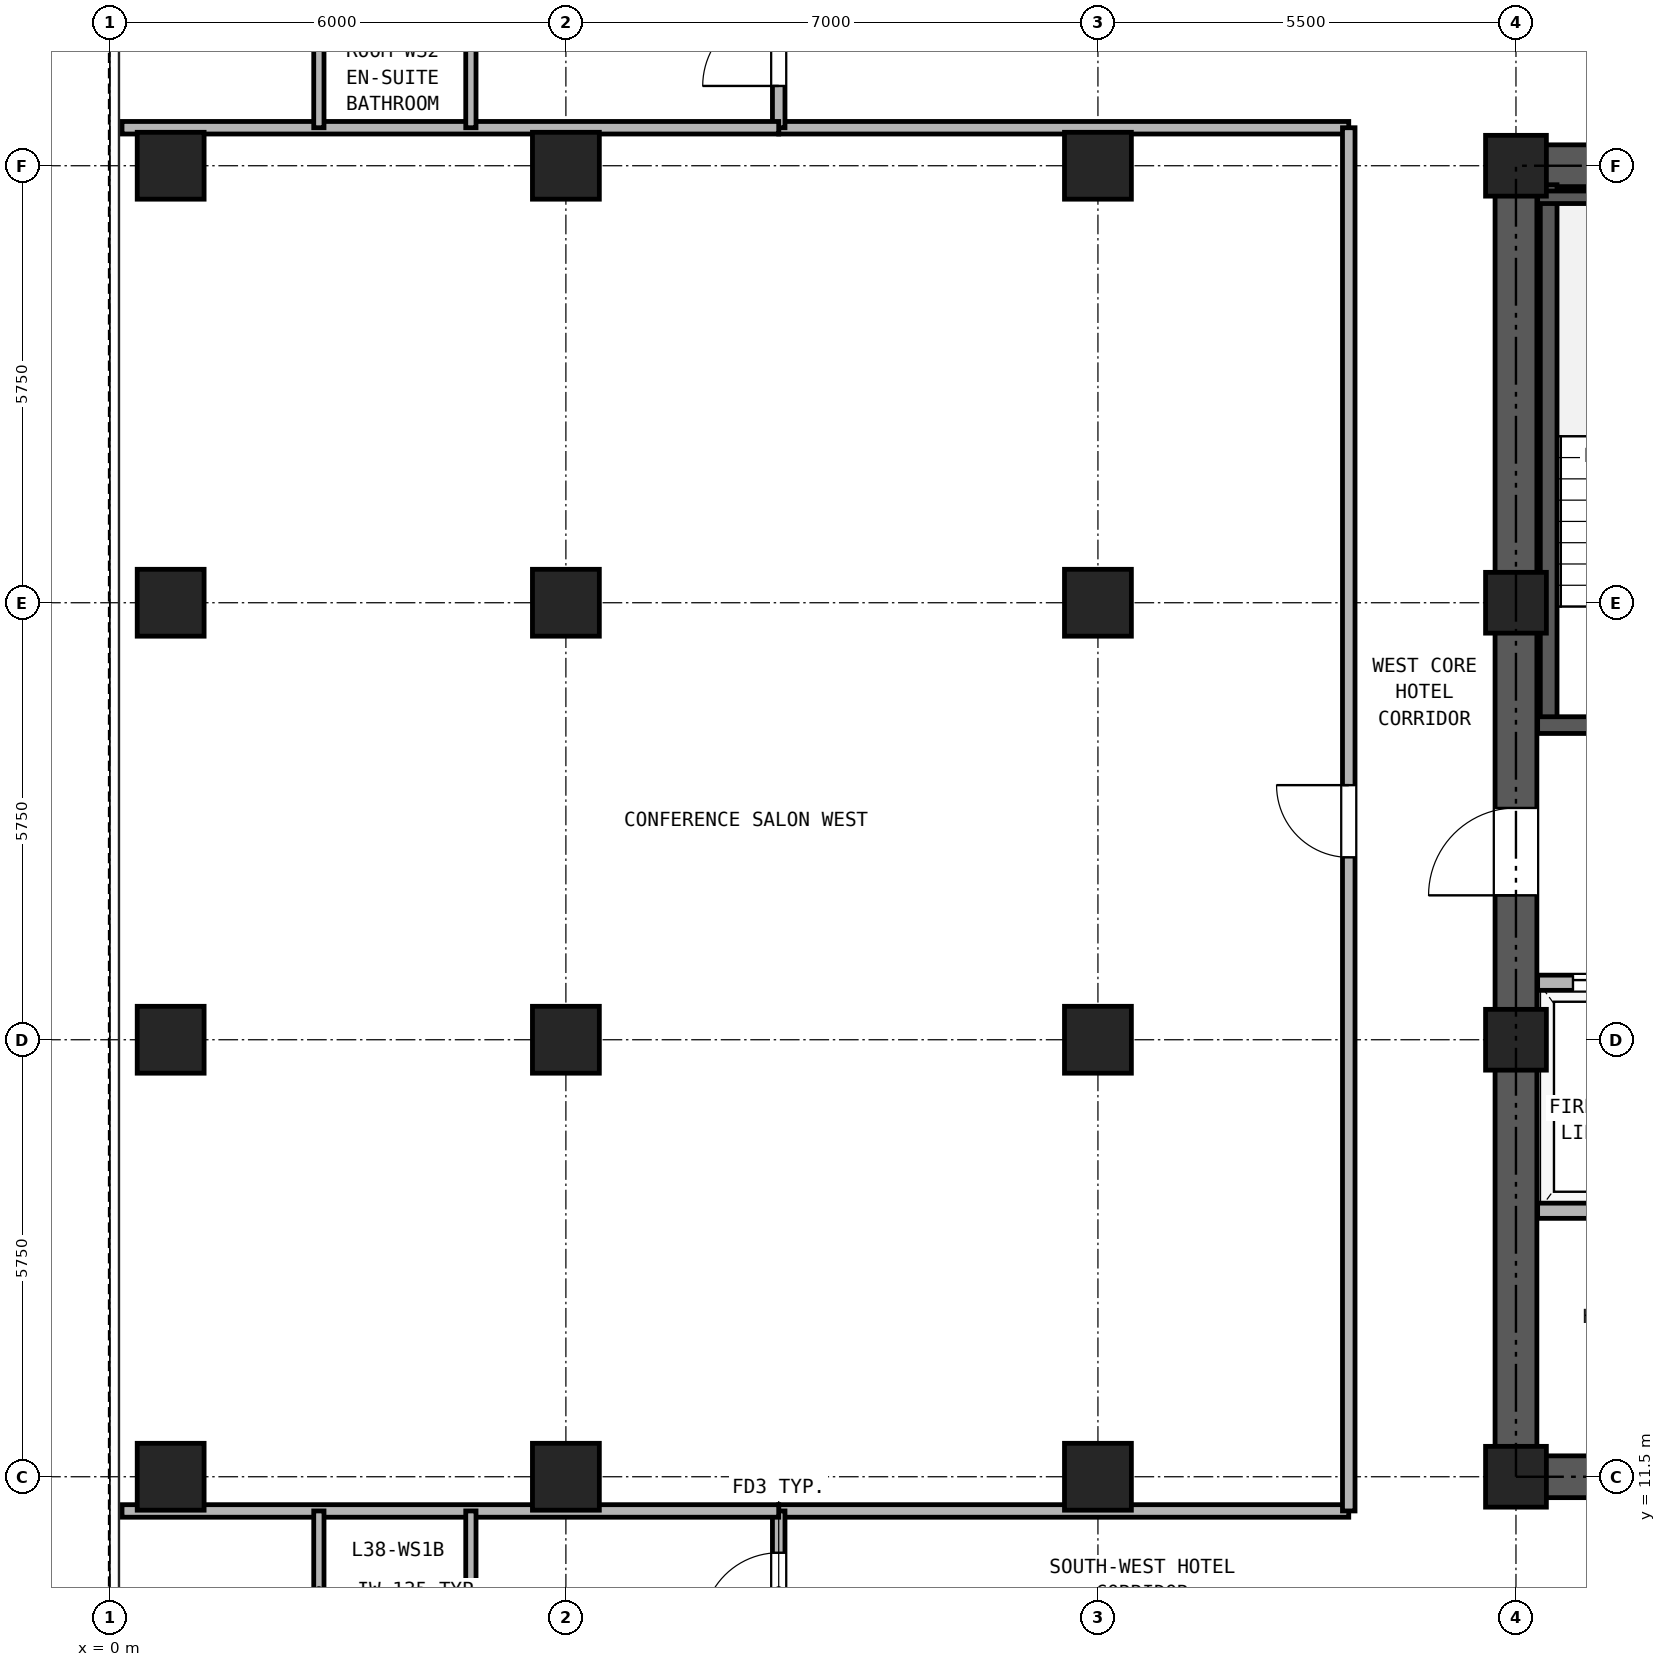
"""IFC4 building model, lengths in metres.
Left out: names, types, materials, properties, quantities, classifications, styles, units other than length and angle.
Written with IfcOpenShell. Run it as: python <this file> out.ifc"""

import sys

from ifc_helpers import new_model, si_unit, direction, frame, frame_2d, origin, origin_2d, place, context, subcontext, project, spatial, rectangle, hollow_rectangle, extrude, source, transform, mapped, element, fill, save


model = new_model("IFC4")
c1 = context("Model", 3, precision=1e-05, world=origin(), true_north=direction((0.0, 1.0)))
c2 = subcontext(c1, "Body", "Model", "MODEL_VIEW")
j1 = project(units=[si_unit("LENGTHUNIT", "METRE"), si_unit("PLANEANGLEUNIT", "RADIAN")], contexts=[c1])
p1 = place(None, origin())
s1 = spatial("IfcSite", under=j1, at=p1, CompositionType="ELEMENT")
p2 = place(p1, origin())
s2 = spatial("IfcBuilding", under=s1, at=p2, CompositionType="ELEMENT")
p3 = place(p2, frame((0.0, 0.0, 137.5)))
s3 = spatial("IfcBuildingStorey", under=s2, at=p3, CompositionType="ELEMENT", Elevation=137.5)
m1 = source(origin(), c2, "Body", "SweptSolid", [
    extrude(hollow_rectangle(XDim=0.88, YDim=0.88, WallThickness=0.05, at=origin_2d()), origin(), (0.0, 0.0, 1.0), 2.95),
])
for number, where, z_axis, x_axis in (
    (1, (0.8, 11.5, 0.0), (0.0, 0.0, 1.0), (1.0, 0.0, 0.0)),
    (2, (0.8, 17.25, 0.0), (0.0, 0.0, 1.0), (1.0, 0.0, 0.0)),
    (3, (0.8, 23.0, 0.0), (0.0, 0.0, 1.0), (1.0, 0.0, 0.0)),
    (4, (0.8, 28.75, 0.0), (0.0, 0.0, 1.0), (1.0, 0.0, 0.0)),
    (5, (6.0, 11.5, 0.0), (0.0, 0.0, 1.0), (1.0, 0.0, 0.0)),
    (6, (6.0, 17.25, 0.0), (0.0, 0.0, 1.0), (1.0, 0.0, 0.0)),
    (7, (6.0, 23.0, 0.0), (0.0, 0.0, 1.0), (1.0, 0.0, 0.0)),
    (8, (6.0, 28.75, 0.0), (0.0, 0.0, 1.0), (1.0, 0.0, 0.0)),
    (9, (13.0, 11.5, 0.0), (0.0, 0.0, 1.0), (1.0, 0.0, 0.0)),
    (10, (13.0, 17.25, 0.0), (0.0, 0.0, 1.0), (1.0, 0.0, 0.0)),
    (11, (13.0, 23.0, 0.0), (0.0, 0.0, 1.0), (1.0, 0.0, 0.0)),
    (12, (13.0, 28.75, 0.0), (0.0, 0.0, 1.0), (1.0, 0.0, 0.0)),
):
    element("IfcColumn", number, at=place(p3, frame(where, z_axis=z_axis, x_axis=x_axis)), inside=s3, PredefinedType="COLUMN", context=c2, shape_type="MappedRepresentation", body=[
        mapped(m1, transform((0.0, 0.0, 0.0), x_axis=(1.0, 0.0, 0.0), y_axis=(0.0, 1.0, 0.0), z_axis=(0.0, 0.0, 1.0), scale=1.0)),
    ])
m2 = source(origin(), c2, "Body", "SweptSolid", [
    extrude(hollow_rectangle(XDim=0.8, YDim=0.8, WallThickness=0.045, at=origin_2d()), origin(), (0.0, 0.0, 1.0), 2.95),
])
for number, where, z_axis, x_axis in (
    (13, (18.5, 11.5, 0.0), (0.0, 0.0, 1.0), (1.0, 0.0, 0.0)),
    (14, (18.5, 17.25, 0.0), (0.0, 0.0, 1.0), (1.0, 0.0, 0.0)),
    (15, (18.5, 23.0, 0.0), (0.0, 0.0, 1.0), (1.0, 0.0, 0.0)),
    (16, (18.5, 28.75, 0.0), (0.0, 0.0, 1.0), (1.0, 0.0, 0.0)),
):
    element("IfcColumn", number, at=place(p3, frame(where, z_axis=z_axis, x_axis=x_axis)), inside=s3, PredefinedType="COLUMN", context=c2, shape_type="MappedRepresentation", body=[
        mapped(m2, transform((0.0, 0.0, 0.0), x_axis=(1.0, 0.0, 0.0), y_axis=(0.0, 1.0, 0.0), z_axis=(0.0, 0.0, 1.0), scale=1.0)),
    ])
p4 = place(p3, frame((18.225, 11.5, 0.0), z_axis=(0.0, 0.0, 1.0), x_axis=(1.0, 0.0, 0.0)))
e17 = element("IfcWall", 17, at=p4, inside=s3, PredefinedType="SHEAR", context=c2, shape_type="SweptSolid", body=[
    extrude(rectangle(XDim=10.55, YDim=0.55, at=frame_2d((5.275, 0.0))), origin(), (0.0, 0.0, 1.0), 2.95),
])
p5 = place(p4, frame((2.375, 0.0, 0.0)))
e18 = element("IfcOpeningElement", 18, at=p5, cuts=e17, PredefinedType="OPENING", context=c2, shape_type="SweptSolid", body=[
    extrude(rectangle(XDim=0.95, YDim=2.15, at=frame_2d((0.475, 1.075))), frame((0.0, 0.285, 0.0), z_axis=(0.0, -1.0, 0.0), x_axis=(1.0, 0.0, 0.0)), (0.0, 0.0, 1.0), 0.57),
])
p6 = place(p4, frame((5.875, 0.0, 0.0)))
e19 = element("IfcOpeningElement", 19, at=p6, cuts=e17, PredefinedType="OPENING", context=c2, shape_type="SweptSolid", body=[
    extrude(rectangle(XDim=1.1, YDim=2.25, at=frame_2d((0.55, 1.125))), frame((0.0, 0.285, 0.0), z_axis=(0.0, -1.0, 0.0), x_axis=(1.0, 0.0, 0.0)), (0.0, 0.0, 1.0), 0.57),
])
p7 = place(p4, frame((8.275, 0.0, 0.0)))
e20 = element("IfcOpeningElement", 20, at=p7, cuts=e17, PredefinedType="OPENING", context=c2, shape_type="SweptSolid", body=[
    extrude(rectangle(XDim=1.1, YDim=2.25, at=frame_2d((0.55, 1.125))), frame((0.0, 0.285, 0.0), z_axis=(0.0, -1.0, 0.0), x_axis=(1.0, 0.0, 0.0)), (0.0, 0.0, 1.0), 0.57),
])
p8 = place(p3, frame((18.225, 28.75, 0.0), z_axis=(0.0, 0.0, 1.0), x_axis=(1.0, 0.0, 0.0)))
e21 = element("IfcWall", 21, at=p8, inside=s3, PredefinedType="SHEAR", context=c2, shape_type="SweptSolid", body=[
    extrude(rectangle(XDim=10.55, YDim=0.55, at=frame_2d((5.275, 0.0))), origin(), (0.0, 0.0, 1.0), 2.95),
])
p9 = place(p8, frame((4.155, 0.0, 0.0)))
e22 = element("IfcOpeningElement", 22, at=p9, cuts=e21, PredefinedType="OPENING", context=c2, shape_type="SweptSolid", body=[
    extrude(rectangle(XDim=0.9, YDim=2.05, at=frame_2d((0.45, 1.025))), frame((0.0, 0.285, 0.0), z_axis=(0.0, -1.0, 0.0), x_axis=(1.0, 0.0, 0.0)), (0.0, 0.0, 1.0), 0.57),
])
p10 = place(p8, frame((5.695, 0.0, 0.0)))
e23 = element("IfcOpeningElement", 23, at=p10, cuts=e21, PredefinedType="OPENING", context=c2, shape_type="SweptSolid", body=[
    extrude(rectangle(XDim=0.9, YDim=2.05, at=frame_2d((0.45, 1.025))), frame((0.0, 0.285, 0.0), z_axis=(0.0, -1.0, 0.0), x_axis=(1.0, 0.0, 0.0)), (0.0, 0.0, 1.0), 0.57),
])
p11 = place(p3, frame((18.5, 11.775, 0.0), z_axis=(0.0, 0.0, 1.0), x_axis=(0.0, 1.0, 0.0)))
e24 = element("IfcWall", 24, at=p11, inside=s3, PredefinedType="SHEAR", context=c2, shape_type="SweptSolid", body=[
    extrude(rectangle(XDim=16.7, YDim=0.55, at=frame_2d((8.35, 0.0))), origin(), (0.0, 0.0, 1.0), 2.95),
])
p12 = place(p11, frame((7.375, 0.0, 0.0)))
e25 = element("IfcOpeningElement", 25, at=p12, cuts=e24, PredefinedType="OPENING", context=c2, shape_type="SweptSolid", body=[
    extrude(rectangle(XDim=1.15, YDim=2.2, at=frame_2d((0.575, 1.1))), frame((0.0, 0.285, 0.0), z_axis=(0.0, -1.0, 0.0), x_axis=(1.0, 0.0, 0.0)), (0.0, 0.0, 1.0), 0.57),
])
p13 = place(p3, frame((18.93, 21.39, 0.0), z_axis=(0.0, 0.0, 1.0), x_axis=(0.0, 1.0, 0.0)))
e26 = element("IfcWall", 26, at=p13, inside=s3, PredefinedType="SOLIDWALL", context=c2, shape_type="SweptSolid", body=[
    extrude(rectangle(XDim=7.11, YDim=0.22, at=frame_2d((3.555, 0.0))), origin(), (0.0, 0.0, 1.0), 2.95),
])
p14 = place(p3, frame((18.785, 28.335, 0.0), z_axis=(0.0, 0.0, 1.0), x_axis=(1.0, 0.0, 0.0)))
e27 = element("IfcWall", 27, at=p14, inside=s3, PredefinedType="PARTITIONING", context=c2, shape_type="SweptSolid", body=[
    extrude(rectangle(XDim=3.325, YDim=0.165, at=frame_2d((1.663, 0.0))), origin(), (0.0, 0.0, 1.0), 2.95),
])
p15 = place(p3, frame((18.785, 21.39, 0.0), z_axis=(0.0, 0.0, 1.0), x_axis=(1.0, 0.0, 0.0)))
e28 = element("IfcWall", 28, at=p15, inside=s3, PredefinedType="SOLIDWALL", context=c2, shape_type="SweptSolid", body=[
    extrude(rectangle(XDim=6.345, YDim=0.22, at=frame_2d((3.172, 0.0))), origin(), (0.0, 0.0, 1.0), 2.95),
])
p16 = place(p15, frame((1.065, 0.0, 0.0)))
e29 = element("IfcOpeningElement", 29, at=p16, cuts=e28, PredefinedType="OPENING", context=c2, shape_type="SweptSolid", body=[
    extrude(rectangle(XDim=1.15, YDim=2.2, at=frame_2d((0.575, 1.1))), frame((0.0, 0.12, 0.0), z_axis=(0.0, -1.0, 0.0), x_axis=(1.0, 0.0, 0.0)), (0.0, 0.0, 1.0), 0.24),
])
p17 = place(p15, frame((4.795, 0.0, 0.0)))
e30 = element("IfcOpeningElement", 30, at=p17, cuts=e28, PredefinedType="OPENING", context=c2, shape_type="SweptSolid", body=[
    extrude(rectangle(XDim=1.1, YDim=2.25, at=frame_2d((0.55, 1.125))), frame((0.0, 0.12, 0.0), z_axis=(0.0, -1.0, 0.0), x_axis=(1.0, 0.0, 0.0)), (0.0, 0.0, 1.0), 0.24),
])
p18 = place(p3, frame((18.785, 18.0, 0.0), z_axis=(0.0, 0.0, 1.0), x_axis=(1.0, 0.0, 0.0)))
e31 = element("IfcWall", 31, at=p18, inside=s3, PredefinedType="PARTITIONING", context=c2, shape_type="SweptSolid", body=[
    extrude(rectangle(XDim=9.43, YDim=0.2, at=frame_2d((4.715, 0.0))), origin(), (0.0, 0.0, 1.0), 2.95),
])
p19 = place(p18, frame((0.465, 0.0, 0.0)))
e32 = element("IfcOpeningElement", 32, at=p19, cuts=e31, PredefinedType="OPENING", context=c2, shape_type="SweptSolid", body=[
    extrude(rectangle(XDim=1.3, YDim=2.3, at=frame_2d((0.65, 1.15))), frame((0.0, 0.11, 0.0), z_axis=(0.0, -1.0, 0.0), x_axis=(1.0, 0.0, 0.0)), (0.0, 0.0, 1.0), 0.22),
])
p20 = place(p18, frame((2.565, 0.0, 0.0)))
e33 = element("IfcOpeningElement", 33, at=p20, cuts=e31, PredefinedType="OPENING", context=c2, shape_type="SweptSolid", body=[
    extrude(rectangle(XDim=1.3, YDim=2.3, at=frame_2d((0.65, 1.15))), frame((0.0, 0.11, 0.0), z_axis=(0.0, -1.0, 0.0), x_axis=(1.0, 0.0, 0.0)), (0.0, 0.0, 1.0), 0.22),
])
p21 = place(p18, frame((7.065, 0.0, 0.0)))
e34 = element("IfcOpeningElement", 34, at=p21, cuts=e31, PredefinedType="OPENING", context=c2, shape_type="SweptSolid", body=[
    extrude(rectangle(XDim=1.0, YDim=2.15, at=frame_2d((0.5, 1.075))), frame((0.0, 0.11, 0.0), z_axis=(0.0, -1.0, 0.0), x_axis=(1.0, 0.0, 0.0)), (0.0, 0.0, 1.0), 0.22),
])
p22 = place(p3, frame((18.785, 15.0, 0.0), z_axis=(0.0, 0.0, 1.0), x_axis=(1.0, 0.0, 0.0)))
e35 = element("IfcWall", 35, at=p22, inside=s3, PredefinedType="PARTITIONING", context=c2, shape_type="SweptSolid", body=[
    extrude(rectangle(XDim=9.43, YDim=0.2, at=frame_2d((4.715, 0.0))), origin(), (0.0, 0.0, 1.0), 2.95),
])
for number, where, z_axis, x_axis in (
    (36, (8.8, 11.05, 0.0), (0.0, 0.0, 1.0), (1.0, 0.0, 0.0)),
    (37, (8.8, 29.25, 0.0), (0.0, 0.0, 1.0), (1.0, 0.0, 0.0)),
):
    element("IfcWall", number, at=place(p3, frame(where, z_axis=z_axis, x_axis=x_axis)), inside=s3, PredefinedType="PARTITIONING", context=c2, shape_type="SweptSolid", body=[
        extrude(rectangle(XDim=7.5, YDim=0.165, at=frame_2d((3.75, 0.0))), origin(), (0.0, 0.0, 1.0), 2.95),
    ])
p23 = place(p3, frame((16.3, 11.05, 0.0), z_axis=(0.0, 0.0, 1.0), x_axis=(0.0, 1.0, 0.0)))
e38 = element("IfcWall", 38, at=p23, inside=s3, PredefinedType="PARTITIONING", context=c2, shape_type="SweptSolid", body=[
    extrude(rectangle(XDim=18.2, YDim=0.165, at=frame_2d((9.1, 0.0))), origin(), (0.0, 0.0, 1.0), 2.95),
])
p24 = place(p23, frame((8.6, 0.0, 0.0)))
e39 = element("IfcOpeningElement", 39, at=p24, cuts=e38, PredefinedType="OPENING", context=c2, shape_type="SweptSolid", body=[
    extrude(rectangle(XDim=0.95, YDim=2.15, at=frame_2d((0.475, 1.075))), frame((0.0, 0.093, 0.0), z_axis=(0.0, -1.0, 0.0), x_axis=(1.0, 0.0, 0.0)), (0.0, 0.0, 1.0), 0.185),
])
p25 = place(p3, frame((8.8, 0.16, 0.0), z_axis=(0.0, 0.0, 1.0), x_axis=(0.0, 1.0, 0.0)))
e40 = element("IfcWall", 40, at=p25, inside=s3, PredefinedType="PARTITIONING", context=c2, shape_type="SweptSolid", body=[
    extrude(rectangle(XDim=10.89, YDim=0.165, at=frame_2d((5.445, 0.0))), origin(), (0.0, 0.0, 1.0), 2.95),
])
p26 = place(p25, frame((9.34, 0.0, 0.0)))
e41 = element("IfcOpeningElement", 41, at=p26, cuts=e40, PredefinedType="OPENING", context=c2, shape_type="SweptSolid", body=[
    extrude(rectangle(XDim=1.0, YDim=2.15, at=frame_2d((0.5, 1.075))), frame((0.0, 0.093, 0.0), z_axis=(0.0, -1.0, 0.0), x_axis=(1.0, 0.0, 0.0)), (0.0, 0.0, 1.0), 0.185),
])
p27 = place(p3, frame((8.8, 29.25, 0.0), z_axis=(0.0, 0.0, 1.0), x_axis=(0.0, 1.0, 0.0)))
e42 = element("IfcWall", 42, at=p27, inside=s3, PredefinedType="PARTITIONING", context=c2, shape_type="SweptSolid", body=[
    extrude(rectangle(XDim=5.89, YDim=0.165, at=frame_2d((2.945, 0.0))), origin(), (0.0, 0.0, 1.0), 2.95),
])
p28 = place(p27, frame((0.55, 0.0, 0.0)))
e43 = element("IfcOpeningElement", 43, at=p28, cuts=e42, PredefinedType="OPENING", context=c2, shape_type="SweptSolid", body=[
    extrude(rectangle(XDim=1.0, YDim=2.15, at=frame_2d((0.5, 1.075))), frame((0.0, 0.093, 0.0), z_axis=(0.0, -1.0, 0.0), x_axis=(1.0, 0.0, 0.0)), (0.0, 0.0, 1.0), 0.185),
])
for number, where, z_axis, x_axis in (
    (44, (0.16, 11.05, 0.0), (0.0, 0.0, 1.0), (1.0, 0.0, 0.0)),
    (45, (0.16, 29.25, 0.0), (0.0, 0.0, 1.0), (1.0, 0.0, 0.0)),
):
    element("IfcWall", number, at=place(p3, frame(where, z_axis=z_axis, x_axis=x_axis)), inside=s3, PredefinedType="PARTITIONING", context=c2, shape_type="SweptSolid", body=[
        extrude(rectangle(XDim=8.64, YDim=0.165, at=frame_2d((4.32, 0.0))), origin(), (0.0, 0.0, 1.0), 2.95),
    ])
for number, where, z_axis, x_axis in (
    (46, (2.75, 8.95, 0.0), (0.0, 0.0, 1.0), (0.0, 1.0, 0.0)),
    (47, (4.75, 8.95, 0.0), (0.0, 0.0, 1.0), (0.0, 1.0, 0.0)),
    (48, (2.75, 29.25, 0.0), (0.0, 0.0, 1.0), (0.0, 1.0, 0.0)),
    (49, (4.75, 29.25, 0.0), (0.0, 0.0, 1.0), (0.0, 1.0, 0.0)),
):
    element("IfcWall", number, at=place(p3, frame(where, z_axis=z_axis, x_axis=x_axis)), inside=s3, PredefinedType="PARTITIONING", context=c2, shape_type="SweptSolid", body=[
        extrude(rectangle(XDim=2.1, YDim=0.135, at=frame_2d((1.05, 0.0))), origin(), (0.0, 0.0, 1.0), 2.95),
    ])
p29 = place(p19, origin())
e50 = element("IfcDoor", 50, at=p29, inside=s3, OperationType="DOUBLE_DOOR_SLIDING", PredefinedType="DOOR", context=c2, shape_type="SweptSolid", body=[
    extrude(rectangle(XDim=1.3, YDim=2.3, at=frame_2d((0.65, 1.15))), frame((0.0, 0.025, 0.0), z_axis=(0.0, -1.0, 0.0), x_axis=(1.0, 0.0, 0.0)), (0.0, 0.0, 1.0), 0.05),
])
fill(e32, e50)
p30 = place(p12, frame((1.15, 0.0, 0.0), z_axis=(0.0, 0.0, 1.0), x_axis=(-1.0, 0.0, 0.0)))
e51 = element("IfcDoor", 51, at=p30, inside=s3, OperationType="SINGLE_SWING_LEFT", PredefinedType="DOOR", context=c2, shape_type="SweptSolid", body=[
    extrude(rectangle(XDim=1.15, YDim=2.2, at=frame_2d((0.575, 1.1))), frame((0.0, 0.025, 0.0), z_axis=(0.0, -1.0, 0.0), x_axis=(1.0, 0.0, 0.0)), (0.0, 0.0, 1.0), 0.05),
])
fill(e25, e51)
p31 = place(p26, origin())
e52 = element("IfcDoor", 52, at=p31, inside=s3, OperationType="SINGLE_SWING_LEFT", PredefinedType="DOOR", context=c2, shape_type="SweptSolid", body=[
    extrude(rectangle(XDim=1.0, YDim=2.15, at=frame_2d((0.5, 1.075))), frame((0.0, 0.025, 0.0), z_axis=(0.0, -1.0, 0.0), x_axis=(1.0, 0.0, 0.0)), (0.0, 0.0, 1.0), 0.05),
])
fill(e41, e52)
p32 = place(p28, origin())
e53 = element("IfcDoor", 53, at=p32, inside=s3, OperationType="SINGLE_SWING_LEFT", PredefinedType="DOOR", context=c2, shape_type="SweptSolid", body=[
    extrude(rectangle(XDim=1.0, YDim=2.15, at=frame_2d((0.5, 1.075))), frame((0.0, 0.025, 0.0), z_axis=(0.0, -1.0, 0.0), x_axis=(1.0, 0.0, 0.0)), (0.0, 0.0, 1.0), 0.05),
])
fill(e43, e53)
p33 = place(p24, frame((0.95, 0.0, 0.0), z_axis=(0.0, 0.0, 1.0), x_axis=(-1.0, 0.0, 0.0)))
e54 = element("IfcDoor", 54, at=p33, inside=s3, OperationType="SINGLE_SWING_RIGHT", PredefinedType="DOOR", context=c2, shape_type="SweptSolid", body=[
    extrude(rectangle(XDim=0.95, YDim=2.15, at=frame_2d((0.475, 1.075))), frame((0.0, 0.025, 0.0), z_axis=(0.0, -1.0, 0.0), x_axis=(1.0, 0.0, 0.0)), (0.0, 0.0, 1.0), 0.05),
])
fill(e39, e54)
save(model, sys.argv[1])
